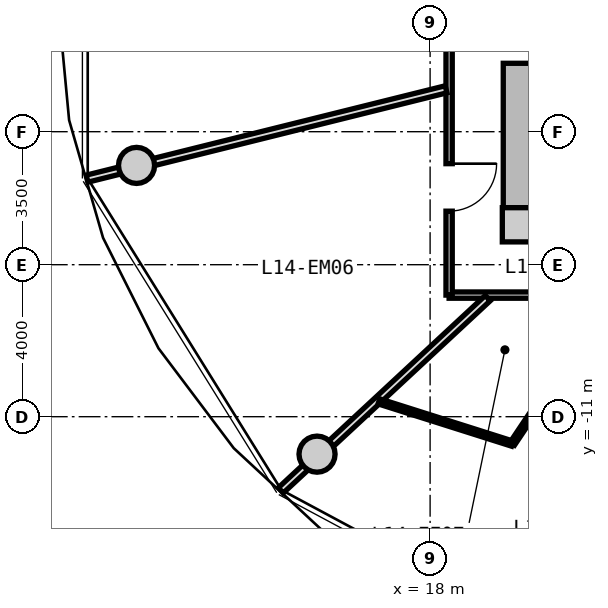
"""IFC4 building model, lengths in metres.
Left out: names, types, materials, properties, quantities, classifications, styles, units other than length and angle.
Written with IfcOpenShell. Run it as: python <this file> out.ifc"""

import sys

from ifc_helpers import new_model, si_unit, direction, frame, frame_2d, origin, origin_2d, place, context, subcontext, project, spatial, rectangle, circle, extrude, source, transform, mapped, element, fill, save


model = new_model("IFC4")
c1 = context("Model", 3, precision=1e-05, world=origin(), true_north=direction((0.0, 1.0)))
c2 = subcontext(c1, "Body", "Model", "MODEL_VIEW")
j1 = project(units=[si_unit("LENGTHUNIT", "METRE"), si_unit("PLANEANGLEUNIT", "RADIAN")], contexts=[c1])
p1 = place(None, origin())
s1 = spatial("IfcSite", under=j1, at=p1, CompositionType="ELEMENT")
p2 = place(p1, origin())
s2 = spatial("IfcBuilding", under=s1, at=p2, CompositionType="ELEMENT")
p3 = place(p2, frame((0.0, 0.0, 49.05)))
s3 = spatial("IfcBuildingStorey", under=s2, at=p3, CompositionType="ELEMENT", Elevation=49.05)
m1 = source(origin(), c2, "Body", "SweptSolid", [
    extrude(rectangle(XDim=0.9, YDim=0.9, at=origin_2d()), origin(), (0.0, 0.0, 1.0), 3.05),
])
p4 = place(p3, frame((20.35, -5.95, 0.0), z_axis=(0.0, 0.0, 1.0), x_axis=(1.0, 0.0, 0.0)))
e1 = element("IfcColumn", 1, at=p4, inside=s3, PredefinedType="COLUMN", context=c2, shape_type="MappedRepresentation", body=[
    mapped(m1, transform((0.0, 0.0, 0.0), x_axis=(1.0, 0.0, 0.0), y_axis=(0.0, 1.0, 0.0), z_axis=(0.0, 0.0, 1.0), scale=1.0)),
])
m2 = source(origin(), c2, "Body", "SweptSolid", [
    extrude(rectangle(XDim=11.0, YDim=0.85, at=frame_2d((5.5, 0.0))), origin(), (0.0, 0.0, 1.0), 2.79),
])
p5 = place(p3, frame((20.35, -5.5, 0.0), z_axis=(0.0, 0.0, 1.0), x_axis=(0.0, 1.0, 0.0)))
e2 = element("IfcWall", 2, at=p5, inside=s3, PredefinedType="SHEAR", context=c2, shape_type="MappedRepresentation", body=[
    mapped(m2, transform((0.0, 0.0, 0.0), x_axis=(1.0, 0.0, 0.0), y_axis=(0.0, 1.0, 0.0), z_axis=(0.0, 0.0, 1.0), scale=1.0)),
])
p6 = place(p5, frame((3.8, 0.0, 0.0)))
e3 = element("IfcOpeningElement", 3, at=p6, cuts=e2, PredefinedType="OPENING", context=c2, shape_type="SweptSolid", body=[
    extrude(rectangle(XDim=1.2, YDim=2.15, at=frame_2d((0.6, 1.075))), frame((0.0, 0.435, 0.0), z_axis=(0.0, -1.0, 0.0), x_axis=(1.0, 0.0, 0.0)), (0.0, 0.0, 1.0), 0.87),
])
m3 = source(origin(), c2, "Body", "SweptSolid", [
    extrude(circle(Radius=0.475, at=origin_2d()), origin(), (0.0, 0.0, 1.0), 3.05),
])
for number, where, z_axis, x_axis in (
    (4, (10.275, -4.387, 0.0), (0.0, 0.0, 1.0), (1.0, 0.0, 0.0)),
    (5, (15.025, -11.985, 0.0), (0.0, 0.0, 1.0), (1.0, 0.0, 0.0)),
):
    element("IfcColumn", number, at=place(p3, frame(where, z_axis=z_axis, x_axis=x_axis)), inside=s3, PredefinedType="COLUMN", context=c2, shape_type="MappedRepresentation", body=[
        mapped(m3, transform((0.0, 0.0, 0.0), x_axis=(1.0, 0.0, 0.0), y_axis=(0.0, 1.0, 0.0), z_axis=(0.0, 0.0, 1.0), scale=1.0)),
    ])
m4 = source(origin(), c2, "Body", "SweptSolid", [
    extrude(rectangle(XDim=19.0, YDim=0.165, at=frame_2d((9.5, 0.0))), origin(), (0.0, 0.0, 1.0), 2.775),
])
p7 = place(p3, frame((37.5, -7.8, 0.0), z_axis=(0.0, 0.0, 1.0), x_axis=(-1.0, 0.0, 0.0)))
e6 = element("IfcWall", 6, at=p7, inside=s3, PredefinedType="PARTITIONING", context=c2, shape_type="MappedRepresentation", body=[
    mapped(m4, transform((0.0, 0.0, 0.0), x_axis=(1.0, 0.0, 0.0), y_axis=(0.0, 1.0, 0.0), z_axis=(0.0, 0.0, 1.0), scale=1.0)),
])
p8 = place(p7, frame((12.706, 0.0, 0.0)))
e7 = element("IfcOpeningElement", 7, at=p8, cuts=e6, PredefinedType="OPENING", context=c2, shape_type="SweptSolid", body=[
    extrude(rectangle(XDim=1.05, YDim=2.15, at=frame_2d((0.525, 1.075))), frame((0.0, 0.093, 0.0), z_axis=(0.0, -1.0, 0.0), x_axis=(1.0, 0.0, 0.0)), (0.0, 0.0, 1.0), 0.185),
])
p9 = place(p7, frame((7.959, 0.0, 0.0)))
e8 = element("IfcOpeningElement", 8, at=p9, cuts=e6, PredefinedType="OPENING", context=c2, shape_type="SweptSolid", body=[
    extrude(rectangle(XDim=1.05, YDim=2.15, at=frame_2d((0.525, 1.075))), frame((0.0, 0.093, 0.0), z_axis=(0.0, -1.0, 0.0), x_axis=(1.0, 0.0, 0.0)), (0.0, 0.0, 1.0), 0.185),
])
p10 = place(p7, frame((2.451, 0.0, 0.0)))
e9 = element("IfcOpeningElement", 9, at=p10, cuts=e6, PredefinedType="OPENING", context=c2, shape_type="SweptSolid", body=[
    extrude(rectangle(XDim=1.05, YDim=2.15, at=frame_2d((0.525, 1.075))), frame((0.0, 0.093, 0.0), z_axis=(0.0, -1.0, 0.0), x_axis=(1.0, 0.0, 0.0)), (0.0, 0.0, 1.0), 0.185),
])
m5 = source(origin(), c2, "Body", "SweptSolid", [
    extrude(rectangle(XDim=15.6, YDim=0.165, at=frame_2d((7.8, 0.0))), origin(), (0.0, 0.0, 1.0), 2.775),
])
p11 = place(p3, frame((18.5, -7.8, 0.0), z_axis=(0.0, 0.0, 1.0), x_axis=(0.0, 1.0, 0.0)))
e10 = element("IfcWall", 10, at=p11, inside=s3, PredefinedType="PARTITIONING", context=c2, shape_type="MappedRepresentation", body=[
    mapped(m5, transform((0.0, 0.0, 0.0), x_axis=(1.0, 0.0, 0.0), y_axis=(0.0, 1.0, 0.0), z_axis=(0.0, 0.0, 1.0), scale=1.0)),
])
p12 = place(p11, frame((12.141, 0.0, 0.0)))
e11 = element("IfcOpeningElement", 11, at=p12, cuts=e10, PredefinedType="OPENING", context=c2, shape_type="SweptSolid", body=[
    extrude(rectangle(XDim=1.25, YDim=2.2, at=frame_2d((0.625, 1.1))), frame((0.0, 0.093, 0.0), z_axis=(0.0, -1.0, 0.0), x_axis=(1.0, 0.0, 0.0)), (0.0, 0.0, 1.0), 0.185),
])
p13 = place(p11, frame((7.175, 0.0, 0.0)))
e12 = element("IfcOpeningElement", 12, at=p13, cuts=e10, PredefinedType="OPENING", context=c2, shape_type="SweptSolid", body=[
    extrude(rectangle(XDim=1.25, YDim=2.2, at=frame_2d((0.625, 1.1))), frame((0.0, 0.093, 0.0), z_axis=(0.0, -1.0, 0.0), x_axis=(1.0, 0.0, 0.0)), (0.0, 0.0, 1.0), 0.185),
])
p14 = place(p11, frame((2.208, 0.0, 0.0)))
e13 = element("IfcOpeningElement", 13, at=p14, cuts=e10, PredefinedType="OPENING", context=c2, shape_type="SweptSolid", body=[
    extrude(rectangle(XDim=1.25, YDim=2.2, at=frame_2d((0.625, 1.1))), frame((0.0, 0.093, 0.0), z_axis=(0.0, -1.0, 0.0), x_axis=(1.0, 0.0, 0.0)), (0.0, 0.0, 1.0), 0.185),
])
m6 = source(origin(), c2, "Body", "SweptSolid", [
    extrude(rectangle(XDim=9.737, YDim=0.19, at=frame_2d((4.869, 0.0))), origin(), (0.0, 0.0, 1.0), 2.225),
])
p15 = place(p3, frame((18.42, -2.385, 0.0), z_axis=(0.0, 0.0, 1.0), x_axis=(-0.970392716238, -0.241532557375, 0.0)))
e14 = element("IfcWall", 14, at=p15, inside=s3, PredefinedType="PARTITIONING", context=c2, shape_type="MappedRepresentation", body=[
    mapped(m6, transform((0.0, 0.0, 0.0), x_axis=(1.0, 0.0, 0.0), y_axis=(0.0, 1.0, 0.0), z_axis=(0.0, 0.0, 1.0), scale=1.0)),
])
m7 = source(origin(), c2, "Body", "SweptSolid", [
    extrude(rectangle(XDim=7.435, YDim=0.19, at=frame_2d((3.717, 0.0))), origin(), (0.0, 0.0, 1.0), 2.225),
])
p16 = place(p3, frame((19.517, -7.88, 0.0), z_axis=(0.0, 0.0, 1.0), x_axis=(-0.732651956848, -0.680603489652, 0.0)))
e15 = element("IfcWall", 15, at=p16, inside=s3, PredefinedType="PARTITIONING", context=c2, shape_type="MappedRepresentation", body=[
    mapped(m7, transform((0.0, 0.0, 0.0), x_axis=(1.0, 0.0, 0.0), y_axis=(0.0, 1.0, 0.0), z_axis=(0.0, 0.0, 1.0), scale=1.0)),
])
m8 = source(origin(), c2, "Body", "SweptSolid", [
    extrude(rectangle(XDim=4.668, YDim=0.14, at=frame_2d((2.334, 0.0))), origin(), (0.0, 0.0, 1.0), 2.775),
])
p17 = place(p3, frame((22.76, -7.83, 0.0), z_axis=(0.0, 0.0, 1.0), x_axis=(-0.55615986029, -0.83107533341, 0.0)))
e16 = element("IfcWall", 16, at=p17, inside=s3, PredefinedType="PARTITIONING", context=c2, shape_type="MappedRepresentation", body=[
    mapped(m8, transform((0.0, 0.0, 0.0), x_axis=(1.0, 0.0, 0.0), y_axis=(0.0, 1.0, 0.0), z_axis=(0.0, 0.0, 1.0), scale=1.0)),
])
p18 = place(p17, frame((1.874, 0.0, 0.0)))
e17 = element("IfcOpeningElement", 17, at=p18, cuts=e16, PredefinedType="OPENING", context=c2, shape_type="SweptSolid", body=[
    extrude(rectangle(XDim=0.92, YDim=2.1, at=frame_2d((0.46, 1.05))), frame((0.0, 0.08, 0.0), z_axis=(0.0, -1.0, 0.0), x_axis=(1.0, 0.0, 0.0)), (0.0, 0.0, 1.0), 0.16),
])
m9 = source(origin(), c2, "Body", "SweptSolid", [
    extrude(rectangle(XDim=3.684, YDim=0.14, at=frame_2d((1.842, 0.0))), origin(), (0.0, 0.0, 1.0), 2.775),
])
p19 = place(p3, frame((20.164, -11.709, 0.0), z_axis=(0.0, 0.0, 1.0), x_axis=(-0.953245538614, 0.302196861518, 0.0)))
e18 = element("IfcWall", 18, at=p19, inside=s3, PredefinedType="PARTITIONING", context=c2, shape_type="MappedRepresentation", body=[
    mapped(m9, transform((0.0, 0.0, 0.0), x_axis=(1.0, 0.0, 0.0), y_axis=(0.0, 1.0, 0.0), z_axis=(0.0, 0.0, 1.0), scale=1.0)),
])
m10 = source(origin(), c2, "Body", "SweptSolid", [
    extrude(rectangle(XDim=1.2, YDim=2.15, at=frame_2d((0.6, 1.075))), frame((0.0, 0.025, 0.0), z_axis=(0.0, -1.0, 0.0), x_axis=(1.0, 0.0, 0.0)), (0.0, 0.0, 1.0), 0.05),
])
p20 = place(p6, frame((1.2, 0.0, 0.0), z_axis=(0.0, 0.0, 1.0), x_axis=(-1.0, 0.0, 0.0)))
e19 = element("IfcDoor", 19, at=p20, inside=s3, OperationType="SINGLE_SWING_LEFT", PredefinedType="DOOR", context=c2, shape_type="MappedRepresentation", body=[
    mapped(m10, transform((0.0, 0.0, 0.0), x_axis=(1.0, 0.0, 0.0), y_axis=(0.0, 1.0, 0.0), z_axis=(0.0, 0.0, 1.0), scale=1.0)),
])
fill(e3, e19)
m11 = source(origin(), c2, "Body", "SweptSolid", [
    extrude(rectangle(XDim=1.25, YDim=2.2, at=frame_2d((0.625, 1.1))), frame((0.0, 0.025, 0.0), z_axis=(0.0, -1.0, 0.0), x_axis=(1.0, 0.0, 0.0)), (0.0, 0.0, 1.0), 0.05),
])
p21 = place(p14, frame((1.25, 0.0, 0.0), z_axis=(0.0, 0.0, 1.0), x_axis=(-1.0, 0.0, 0.0)))
e20 = element("IfcDoor", 20, at=p21, inside=s3, OperationType="SINGLE_SWING_LEFT", PredefinedType="DOOR", context=c2, shape_type="MappedRepresentation", body=[
    mapped(m11, transform((0.0, 0.0, 0.0), x_axis=(1.0, 0.0, 0.0), y_axis=(0.0, 1.0, 0.0), z_axis=(0.0, 0.0, 1.0), scale=1.0)),
])
fill(e13, e20)
save(model, sys.argv[1])
